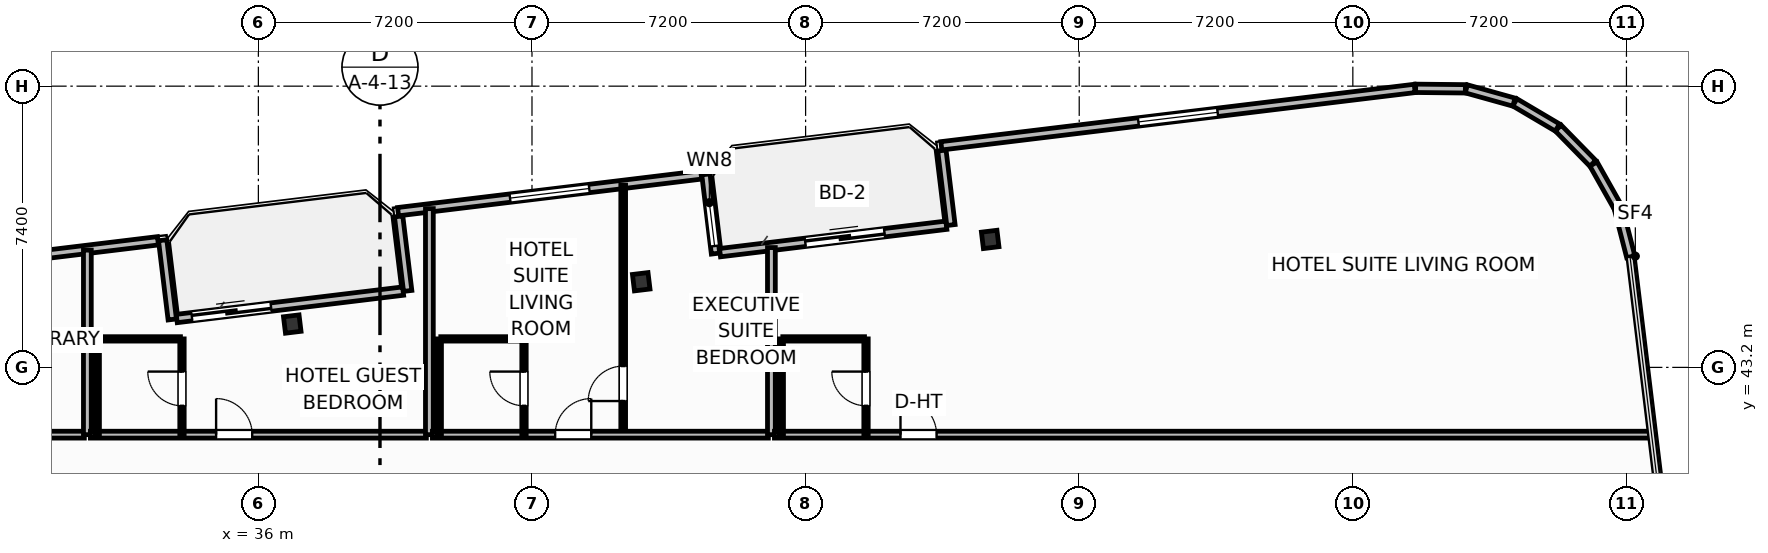
"""IFC4 building model, lengths in metres.
Left out: names, types, materials, properties, quantities, classifications, styles, units other than length and angle.
Written with IfcOpenShell. Run it as: python <this file> out.ifc"""

import sys

from ifc_helpers import new_model, si_unit, direction, frame, frame_2d, origin, origin_2d, place, context, subcontext, project, spatial, rectangle, i_section, extrude, element, fill, save


model = new_model("IFC4")
c1 = context("Model", 3, precision=1e-05, world=origin(), true_north=direction((0.0, 1.0)))
c2 = subcontext(c1, "Body", "Model", "MODEL_VIEW")
j1 = project(units=[si_unit("LENGTHUNIT", "METRE"), si_unit("PLANEANGLEUNIT", "RADIAN")], contexts=[c1])
p1 = place(None, origin())
s1 = spatial("IfcSite", under=j1, at=p1, CompositionType="ELEMENT")
p2 = place(p1, origin())
s2 = spatial("IfcBuilding", under=s1, at=p2, CompositionType="ELEMENT")
p3 = place(p2, frame((0.0, 0.0, 185.7)))
s3 = spatial("IfcBuildingStorey", under=s2, at=p3, CompositionType="ELEMENT", Elevation=185.7)
for number, where, z_axis, x_axis in (
    (1, (55.257, 46.567, 0.0), (0.0, 0.0, 1.0), (0.993, 0.12, 0.0)),
    (2, (46.075, 45.454, 0.0), (0.0, 0.0, 1.0), (0.993, 0.12, 0.0)),
    (3, (36.892, 44.341, 0.0), (0.0, 0.0, 1.0), (0.993, 0.12, 0.0)),
):
    element("IfcColumn", number, at=place(p3, frame(where, z_axis=z_axis, x_axis=x_axis)), inside=s3, PredefinedType="COLUMN", context=c2, shape_type="SweptSolid", body=[
        extrude(i_section(OverallWidth=0.412, OverallDepth=0.435, WebThickness=0.036, FlangeThickness=0.057, FilletRadius=0.025, at=origin_2d()), origin(), (0.0, 0.0, 1.0), 3.7),
    ])
p4 = place(p3, frame((33.852, 44.486, 0.0), z_axis=(0.0, 0.0, 1.0), x_axis=(0.992729951822, 0.120362962556, 0.0)))
e4 = element("IfcWall", 4, at=p4, inside=s3, PredefinedType="SOLIDWALL", context=c2, shape_type="SweptSolid", body=[
    extrude(rectangle(XDim=6.0, YDim=0.22, at=frame_2d((3.0, 0.0))), origin(), (0.0, 0.0, 1.0), 2.73),
])
p5 = place(p4, frame((0.4, 0.0, 0.0)))
e5 = element("IfcOpeningElement", 5, at=p5, cuts=e4, PredefinedType="OPENING", context=c2, shape_type="SweptSolid", body=[
    extrude(rectangle(XDim=2.1, YDim=2.3, at=frame_2d((1.05, 1.15))), frame((0.0, 0.12, 0.0), z_axis=(0.0, -1.0, 0.0), x_axis=(1.0, 0.0, 0.0)), (0.0, 0.0, 1.0), 0.24),
])
p6 = place(p3, frame((48.148, 46.219, 0.0), z_axis=(0.0, 0.0, 1.0), x_axis=(0.992729951822, 0.120362962556, 0.0)))
e6 = element("IfcWall", 6, at=p6, inside=s3, PredefinedType="SOLIDWALL", context=c2, shape_type="SweptSolid", body=[
    extrude(rectangle(XDim=6.0, YDim=0.22, at=frame_2d((3.0, 0.0))), origin(), (0.0, 0.0, 1.0), 2.73),
])
p7 = place(p6, frame((2.26, 0.0, 0.0)))
e7 = element("IfcOpeningElement", 7, at=p7, cuts=e6, PredefinedType="OPENING", context=c2, shape_type="SweptSolid", body=[
    extrude(rectangle(XDim=2.1, YDim=2.3, at=frame_2d((1.05, 1.15))), frame((0.0, 0.12, 0.0), z_axis=(0.0, -1.0, 0.0), x_axis=(1.0, 0.0, 0.0)), (0.0, 0.0, 1.0), 0.24),
])
p8 = place(p3, frame((72.114, 46.112, 0.0), z_axis=(0.0, 0.0, 1.0), x_axis=(-0.248942347653, 0.968518305219, 0.0)))
e8 = element("IfcWall", 8, at=p8, inside=s3, PredefinedType="SOLIDWALL", context=c2, shape_type="SweptSolid", body=[
    extrude(rectangle(XDim=1.326, YDim=0.22, at=frame_2d((0.663, 0.0))), origin(), (0.0, 0.0, 1.0), 2.73),
])
p9 = place(p3, frame((71.771, 47.418, 0.0), z_axis=(0.0, 0.0, 1.0), x_axis=(-0.491098509465, 0.871104043155, 0.0)))
e9 = element("IfcWall", 9, at=p9, inside=s3, PredefinedType="SOLIDWALL", context=c2, shape_type="SweptSolid", body=[
    extrude(rectangle(XDim=1.301, YDim=0.22, at=frame_2d((0.65, 0.0))), origin(), (0.0, 0.0, 1.0), 2.73),
])
p10 = place(p3, frame((71.115, 48.569, 0.0), z_axis=(0.0, 0.0, 1.0), x_axis=(-0.699844331926, 0.714295394827, 0.0)))
e10 = element("IfcWall", 10, at=p10, inside=s3, PredefinedType="SOLIDWALL", context=c2, shape_type="SweptSolid", body=[
    extrude(rectangle(XDim=1.301, YDim=0.22, at=frame_2d((0.65, 0.0))), origin(), (0.0, 0.0, 1.0), 2.73),
])
p11 = place(p3, frame((70.183, 49.511, 0.0), z_axis=(0.0, 0.0, 1.0), x_axis=(-0.860933999601, 0.508716668029, 0.0)))
e11 = element("IfcWall", 11, at=p11, inside=s3, PredefinedType="SOLIDWALL", context=c2, shape_type="SweptSolid", body=[
    extrude(rectangle(XDim=1.301, YDim=0.22, at=frame_2d((0.65, 0.0))), origin(), (0.0, 0.0, 1.0), 2.73),
])
p12 = place(p3, frame((69.039, 50.18, 0.0), z_axis=(0.0, 0.0, 1.0), x_axis=(-0.963205341366, 0.26876657226, 0.0)))
e12 = element("IfcWall", 12, at=p12, inside=s3, PredefinedType="SOLIDWALL", context=c2, shape_type="SweptSolid", body=[
    extrude(rectangle(XDim=1.301, YDim=0.22, at=frame_2d((0.65, 0.0))), origin(), (0.0, 0.0, 1.0), 2.73),
])
p13 = place(p3, frame((67.761, 50.53, 0.0), z_axis=(0.0, 0.0, 1.0), x_axis=(-0.999947358106, 0.010260653861, 0.0)))
e13 = element("IfcWall", 13, at=p13, inside=s3, PredefinedType="SOLIDWALL", context=c2, shape_type="SweptSolid", body=[
    extrude(rectangle(XDim=1.309, YDim=0.22, at=frame_2d((0.654, 0.0))), origin(), (0.0, 0.0, 1.0), 2.73),
])
p14 = place(p3, frame((66.427, 50.54, 0.0), z_axis=(0.0, 0.0, 1.0), x_axis=(-0.992731739233, -0.120348219431, 0.0)))
e14 = element("IfcWall", 14, at=p14, inside=s3, PredefinedType="SOLIDWALL", context=c2, shape_type="SweptSolid", body=[
    extrude(rectangle(XDim=12.547, YDim=0.22, at=frame_2d((6.273, 0.0))), origin(), (0.0, 0.0, 1.0), 2.73),
])
p15 = place(p14, frame((5.224, 0.0, 0.8)))
e15 = element("IfcOpeningElement", 15, at=p15, cuts=e14, PredefinedType="OPENING", context=c2, shape_type="SweptSolid", body=[
    extrude(rectangle(XDim=2.1, YDim=1.75, at=frame_2d((1.05, 0.875))), frame((0.0, 0.12, 0.0), z_axis=(0.0, -1.0, 0.0), x_axis=(1.0, 0.0, 0.0)), (0.0, 0.0, 1.0), 0.24),
])
p16 = place(p3, frame((53.987, 48.906, 0.0), z_axis=(0.0, 0.0, 1.0), x_axis=(0.120397815541, -0.992725725472, 0.0)))
e16 = element("IfcWall", 16, at=p16, inside=s3, PredefinedType="SOLIDWALL", context=c2, shape_type="SweptSolid", body=[
    extrude(rectangle(XDim=1.975, YDim=0.22, at=frame_2d((0.988, 0.0))), origin(), (0.0, 0.0, 1.0), 2.73),
])
p17 = place(p3, frame((48.03, 46.194, 0.0), z_axis=(0.0, 0.0, 1.0), x_axis=(-0.120314009587, 0.992735885871, 0.0)))
e17 = element("IfcWall", 17, at=p17, inside=s3, PredefinedType="SOLIDWALL", context=c2, shape_type="SweptSolid", body=[
    extrude(rectangle(XDim=2.1, YDim=0.22, at=frame_2d((1.05, 0.0))), origin(), (0.0, 0.0, 1.0), 2.73),
])
p18 = place(p17, frame((0.2, 0.0, 0.8)))
e18 = element("IfcOpeningElement", 18, at=p18, cuts=e17, PredefinedType="OPENING", context=c2, shape_type="SweptSolid", body=[
    extrude(rectangle(XDim=1.15, YDim=1.4, at=frame_2d((0.575, 0.7))), frame((0.0, 0.12, 0.0), z_axis=(0.0, -1.0, 0.0), x_axis=(1.0, 0.0, 0.0)), (0.0, 0.0, 1.0), 0.24),
])
p19 = place(p3, frame((47.653, 48.264, 0.0), z_axis=(0.0, 0.0, 1.0), x_axis=(-0.992731032022, -0.120354052946, 0.0)))
e19 = element("IfcWall", 19, at=p19, inside=s3, PredefinedType="SOLIDWALL", context=c2, shape_type="SweptSolid", body=[
    extrude(rectangle(XDim=8.035, YDim=0.22, at=frame_2d((4.018, 0.0))), origin(), (0.0, 0.0, 1.0), 2.73),
])
p20 = place(p19, frame((2.968, 0.0, 0.8)))
e20 = element("IfcOpeningElement", 20, at=p20, cuts=e19, PredefinedType="OPENING", context=c2, shape_type="SweptSolid", body=[
    extrude(rectangle(XDim=2.1, YDim=1.75, at=frame_2d((1.05, 0.875))), frame((0.0, 0.12, 0.0), z_axis=(0.0, -1.0, 0.0), x_axis=(1.0, 0.0, 0.0)), (0.0, 0.0, 1.0), 0.24),
])
p21 = place(p3, frame((39.691, 47.173, 0.0), z_axis=(0.0, 0.0, 1.0), x_axis=(0.120397815541, -0.992725725472, 0.0)))
e21 = element("IfcWall", 21, at=p21, inside=s3, PredefinedType="SOLIDWALL", context=c2, shape_type="SweptSolid", body=[
    extrude(rectangle(XDim=1.975, YDim=0.22, at=frame_2d((0.988, 0.0))), origin(), (0.0, 0.0, 1.0), 2.73),
])
p22 = place(p3, frame((33.734, 44.461, 0.0), z_axis=(0.0, 0.0, 1.0), x_axis=(-0.120327895535, 0.992734202874, 0.0)))
e22 = element("IfcWall", 22, at=p22, inside=s3, PredefinedType="SOLIDWALL", context=c2, shape_type="SweptSolid", body=[
    extrude(rectangle(XDim=2.1, YDim=0.22, at=frame_2d((1.05, 0.0))), origin(), (0.0, 0.0, 1.0), 2.73),
])
p23 = place(p3, frame((33.357, 46.531, 0.0), z_axis=(0.0, 0.0, 1.0), x_axis=(-0.992731032022, -0.120354052946, 0.0)))
e23 = element("IfcWall", 23, at=p23, inside=s3, PredefinedType="SOLIDWALL", context=c2, shape_type="SweptSolid", body=[
    extrude(rectangle(XDim=8.035, YDim=0.22, at=frame_2d((4.018, 0.0))), origin(), (0.0, 0.0, 1.0), 2.73),
])
p24 = place(p23, frame((2.968, 0.0, 0.8)))
e24 = element("IfcOpeningElement", 24, at=p24, cuts=e23, PredefinedType="OPENING", context=c2, shape_type="SweptSolid", body=[
    extrude(rectangle(XDim=2.1, YDim=1.75, at=frame_2d((1.05, 0.875))), frame((0.0, 0.12, 0.0), z_axis=(0.0, -1.0, 0.0), x_axis=(1.0, 0.0, 0.0)), (0.0, 0.0, 1.0), 0.24),
])
p25 = place(p3, frame((3.393, 41.43, 0.0), z_axis=(0.0, 0.0, 1.0), x_axis=(1.0, 0.0, 0.0)))
e25 = element("IfcWall", 25, at=p25, inside=s3, PredefinedType="PARTITIONING", context=c2, shape_type="SweptSolid", body=[
    extrude(rectangle(XDim=28.027, YDim=0.18, at=frame_2d((14.013, 0.0))), origin(), (0.0, 0.0, 1.0), 2.662),
])
p26 = place(p25, frame((22.832, 0.0, 0.0)))
e26 = element("IfcOpeningElement", 26, at=p26, cuts=e25, PredefinedType="OPENING", context=c2, shape_type="SweptSolid", body=[
    extrude(rectangle(XDim=0.95, YDim=2.05, at=frame_2d((0.475, 1.025))), frame((0.0, 0.1, 0.0), z_axis=(0.0, -1.0, 0.0), x_axis=(1.0, 0.0, 0.0)), (0.0, 0.0, 1.0), 0.2),
])
p27 = place(p3, frame((31.5, 41.43, 0.0), z_axis=(0.0, 0.0, 1.0), x_axis=(0.0, 1.0, 0.0)))
e27 = element("IfcWall", 27, at=p27, inside=s3, PredefinedType="PARTITIONING", context=c2, shape_type="SweptSolid", body=[
    extrude(rectangle(XDim=4.856, YDim=0.205, at=frame_2d((2.428, 0.0))), origin(), (0.0, 0.0, 1.0), 3.45),
])
p28 = place(p3, frame((31.58, 41.43, 0.0), z_axis=(0.0, 0.0, 1.0), x_axis=(1.0, 0.0, 0.0)))
e28 = element("IfcWall", 28, at=p28, inside=s3, PredefinedType="PARTITIONING", context=c2, shape_type="SweptSolid", body=[
    extrude(rectangle(XDim=8.84, YDim=0.18, at=frame_2d((4.42, 0.0))), origin(), (0.0, 0.0, 1.0), 3.45),
])
p29 = place(p28, frame((3.308, 0.0, 0.0)))
e29 = element("IfcOpeningElement", 29, at=p29, cuts=e28, PredefinedType="OPENING", context=c2, shape_type="SweptSolid", body=[
    extrude(rectangle(XDim=0.95, YDim=2.15, at=frame_2d((0.475, 1.075))), frame((0.0, 0.1, 0.0), z_axis=(0.0, -1.0, 0.0), x_axis=(1.0, 0.0, 0.0)), (0.0, 0.0, 1.0), 0.2),
])
p30 = place(p3, frame((31.8, 43.95, 0.0), z_axis=(0.0, 0.0, 1.0), x_axis=(1.0, 0.0, 0.0)))
e30 = element("IfcWall", 30, at=p30, inside=s3, PredefinedType="PARTITIONING", context=c2, shape_type="SweptSolid", body=[
    extrude(rectangle(XDim=2.15, YDim=0.115, at=frame_2d((1.075, 0.0))), origin(), (0.0, 0.0, 1.0), 2.824),
])
p31 = place(p3, frame((33.99, 41.43, 0.0), z_axis=(0.0, 0.0, 1.0), x_axis=(0.0, 1.0, 0.0)))
e31 = element("IfcWall", 31, at=p31, inside=s3, PredefinedType="PARTITIONING", context=c2, shape_type="SweptSolid", body=[
    extrude(rectangle(XDim=2.52, YDim=0.115, at=frame_2d((1.26, 0.0))), origin(), (0.0, 0.0, 1.0), 3.45),
])
p32 = place(p31, frame((0.76, 0.0, 0.0)))
e32 = element("IfcOpeningElement", 32, at=p32, cuts=e31, PredefinedType="OPENING", context=c2, shape_type="SweptSolid", body=[
    extrude(rectangle(XDim=0.9, YDim=2.05, at=frame_2d((0.45, 1.025))), frame((0.0, 0.067, 0.0), z_axis=(0.0, -1.0, 0.0), x_axis=(1.0, 0.0, 0.0)), (0.0, 0.0, 1.0), 0.135),
])
p33 = place(p3, frame((31.76, 41.43, 0.0), z_axis=(0.0, 0.0, 1.0), x_axis=(0.0, 1.0, 0.0)))
e33 = element("IfcWall", 33, at=p33, inside=s3, PredefinedType="PARTITIONING", context=c2, shape_type="SweptSolid", body=[
    extrude(rectangle(XDim=2.52, YDim=0.115, at=frame_2d((1.26, 0.0))), origin(), (0.0, 0.0, 1.0), 3.45),
])
p34 = place(p3, frame((40.5, 41.43, 0.0), z_axis=(0.0, 0.0, 1.0), x_axis=(0.0, 1.0, 0.0)))
e34 = element("IfcWall", 34, at=p34, inside=s3, PredefinedType="PARTITIONING", context=c2, shape_type="SweptSolid", body=[
    extrude(rectangle(XDim=5.947, YDim=0.205, at=frame_2d((2.974, 0.0))), origin(), (0.0, 0.0, 1.0), 3.45),
])
p35 = place(p3, frame((45.6, 41.43, 0.0), z_axis=(0.0, 0.0, 1.0), x_axis=(0.0, 1.0, 0.0)))
e35 = element("IfcWall", 35, at=p35, inside=s3, PredefinedType="PARTITIONING", context=c2, shape_type="SweptSolid", body=[
    extrude(rectangle(XDim=6.565, YDim=0.125, at=frame_2d((3.283, 0.0))), origin(), (0.0, 0.0, 1.0), 3.45),
])
p36 = place(p35, frame((0.885, 0.0, 0.0)))
e36 = element("IfcOpeningElement", 36, at=p36, cuts=e35, PredefinedType="OPENING", context=c2, shape_type="SweptSolid", body=[
    extrude(rectangle(XDim=0.92, YDim=2.05, at=frame_2d((0.46, 1.025))), frame((0.0, 0.073, 0.0), z_axis=(0.0, -1.0, 0.0), x_axis=(1.0, 0.0, 0.0)), (0.0, 0.0, 1.0), 0.145),
])
p37 = place(p3, frame((40.58, 41.43, 0.0), z_axis=(0.0, 0.0, 1.0), x_axis=(1.0, 0.0, 0.0)))
e37 = element("IfcWall", 37, at=p37, inside=s3, PredefinedType="PARTITIONING", context=c2, shape_type="SweptSolid", body=[
    extrude(rectangle(XDim=8.84, YDim=0.18, at=frame_2d((4.42, 0.0))), origin(), (0.0, 0.0, 1.0), 3.45),
])
p38 = place(p37, frame((3.23, 0.0, 0.0)))
e38 = element("IfcOpeningElement", 38, at=p38, cuts=e37, PredefinedType="OPENING", context=c2, shape_type="SweptSolid", body=[
    extrude(rectangle(XDim=0.95, YDim=2.15, at=frame_2d((0.475, 1.075))), frame((0.0, 0.1, 0.0), z_axis=(0.0, -1.0, 0.0), x_axis=(1.0, 0.0, 0.0)), (0.0, 0.0, 1.0), 0.2),
])
p39 = place(p3, frame((40.8, 43.95, 0.0), z_axis=(0.0, 0.0, 1.0), x_axis=(1.0, 0.0, 0.0)))
e39 = element("IfcWall", 39, at=p39, inside=s3, PredefinedType="PARTITIONING", context=c2, shape_type="SweptSolid", body=[
    extrude(rectangle(XDim=2.15, YDim=0.115, at=frame_2d((1.075, 0.0))), origin(), (0.0, 0.0, 1.0), 3.45),
])
p40 = place(p3, frame((42.99, 41.43, 0.0), z_axis=(0.0, 0.0, 1.0), x_axis=(0.0, 1.0, 0.0)))
e40 = element("IfcWall", 40, at=p40, inside=s3, PredefinedType="PARTITIONING", context=c2, shape_type="SweptSolid", body=[
    extrude(rectangle(XDim=2.52, YDim=0.115, at=frame_2d((1.26, 0.0))), origin(), (0.0, 0.0, 1.0), 3.45),
])
p41 = place(p40, frame((0.76, 0.0, 0.0)))
e41 = element("IfcOpeningElement", 41, at=p41, cuts=e40, PredefinedType="OPENING", context=c2, shape_type="SweptSolid", body=[
    extrude(rectangle(XDim=0.9, YDim=2.05, at=frame_2d((0.45, 1.025))), frame((0.0, 0.067, 0.0), z_axis=(0.0, -1.0, 0.0), x_axis=(1.0, 0.0, 0.0)), (0.0, 0.0, 1.0), 0.135),
])
p42 = place(p3, frame((40.76, 41.43, 0.0), z_axis=(0.0, 0.0, 1.0), x_axis=(0.0, 1.0, 0.0)))
e42 = element("IfcWall", 42, at=p42, inside=s3, PredefinedType="PARTITIONING", context=c2, shape_type="SweptSolid", body=[
    extrude(rectangle(XDim=2.52, YDim=0.115, at=frame_2d((1.26, 0.0))), origin(), (0.0, 0.0, 1.0), 3.45),
])
p43 = place(p3, frame((49.5, 41.43, 0.0), z_axis=(0.0, 0.0, 1.0), x_axis=(0.0, 1.0, 0.0)))
e43 = element("IfcWall", 43, at=p43, inside=s3, PredefinedType="PARTITIONING", context=c2, shape_type="SweptSolid", body=[
    extrude(rectangle(XDim=4.923, YDim=0.205, at=frame_2d((2.461, 0.0))), origin(), (0.0, 0.0, 1.0), 3.45),
])
p44 = place(p3, frame((49.58, 41.43, 0.0), z_axis=(0.0, 0.0, 1.0), x_axis=(1.0, 0.0, 0.0)))
e44 = element("IfcWall", 44, at=p44, inside=s3, PredefinedType="PARTITIONING", context=c2, shape_type="SweptSolid", body=[
    extrude(rectangle(XDim=23.042, YDim=0.18, at=frame_2d((11.521, 0.0))), origin(), (0.0, 0.0, 1.0), 3.45),
])
p45 = place(p44, frame((3.317, 0.0, 0.0)))
e45 = element("IfcOpeningElement", 45, at=p45, cuts=e44, PredefinedType="OPENING", context=c2, shape_type="SweptSolid", body=[
    extrude(rectangle(XDim=0.95, YDim=2.15, at=frame_2d((0.475, 1.075))), frame((0.0, 0.1, 0.0), z_axis=(0.0, -1.0, 0.0), x_axis=(1.0, 0.0, 0.0)), (0.0, 0.0, 1.0), 0.2),
])
p46 = place(p3, frame((49.8, 43.95, 0.0), z_axis=(0.0, 0.0, 1.0), x_axis=(1.0, 0.0, 0.0)))
e46 = element("IfcWall", 46, at=p46, inside=s3, PredefinedType="PARTITIONING", context=c2, shape_type="SweptSolid", body=[
    extrude(rectangle(XDim=2.15, YDim=0.115, at=frame_2d((1.075, 0.0))), origin(), (0.0, 0.0, 1.0), 3.45),
])
p47 = place(p3, frame((51.99, 41.43, 0.0), z_axis=(0.0, 0.0, 1.0), x_axis=(0.0, 1.0, 0.0)))
e47 = element("IfcWall", 47, at=p47, inside=s3, PredefinedType="PARTITIONING", context=c2, shape_type="SweptSolid", body=[
    extrude(rectangle(XDim=2.52, YDim=0.115, at=frame_2d((1.26, 0.0))), origin(), (0.0, 0.0, 1.0), 3.45),
])
p48 = place(p47, frame((0.76, 0.0, 0.0)))
e48 = element("IfcOpeningElement", 48, at=p48, cuts=e47, PredefinedType="OPENING", context=c2, shape_type="SweptSolid", body=[
    extrude(rectangle(XDim=0.9, YDim=2.05, at=frame_2d((0.45, 1.025))), frame((0.0, 0.067, 0.0), z_axis=(0.0, -1.0, 0.0), x_axis=(1.0, 0.0, 0.0)), (0.0, 0.0, 1.0), 0.135),
])
p49 = place(p3, frame((49.76, 41.43, 0.0), z_axis=(0.0, 0.0, 1.0), x_axis=(0.0, 1.0, 0.0)))
e49 = element("IfcWall", 49, at=p49, inside=s3, PredefinedType="PARTITIONING", context=c2, shape_type="SweptSolid", body=[
    extrude(rectangle(XDim=2.52, YDim=0.115, at=frame_2d((1.26, 0.0))), origin(), (0.0, 0.0, 1.0), 3.45),
])
p50 = place(p5, origin())
e50 = element("IfcDoor", 50, at=p50, inside=s3, OperationType="SLIDING_TO_LEFT", PredefinedType="DOOR", context=c2, shape_type="SweptSolid", body=[
    extrude(rectangle(XDim=2.1, YDim=2.3, at=frame_2d((1.05, 1.15))), frame((0.0, 0.025, 0.0), z_axis=(0.0, -1.0, 0.0), x_axis=(1.0, 0.0, 0.0)), (0.0, 0.0, 1.0), 0.05),
])
fill(e5, e50)
p51 = place(p7, origin())
e51 = element("IfcDoor", 51, at=p51, inside=s3, OperationType="SLIDING_TO_LEFT", PredefinedType="DOOR", context=c2, shape_type="SweptSolid", body=[
    extrude(rectangle(XDim=2.1, YDim=2.3, at=frame_2d((1.05, 1.15))), frame((0.0, 0.025, 0.0), z_axis=(0.0, -1.0, 0.0), x_axis=(1.0, 0.0, 0.0)), (0.0, 0.0, 1.0), 0.05),
])
fill(e7, e51)
p52 = place(p15, origin())
e52 = element("IfcWindow", 52, at=p52, inside=s3, PartitioningType="SINGLE_PANEL", PredefinedType="WINDOW", context=c2, shape_type="SweptSolid", body=[
    extrude(rectangle(XDim=2.1, YDim=1.75, at=frame_2d((1.05, 0.875))), frame((0.0, 0.03, 0.0), z_axis=(0.0, -1.0, 0.0), x_axis=(1.0, 0.0, 0.0)), (0.0, 0.0, 1.0), 0.06),
])
fill(e15, e52)
p53 = place(p20, origin())
e53 = element("IfcWindow", 53, at=p53, inside=s3, PartitioningType="SINGLE_PANEL", PredefinedType="WINDOW", context=c2, shape_type="SweptSolid", body=[
    extrude(rectangle(XDim=2.1, YDim=1.75, at=frame_2d((1.05, 0.875))), frame((0.0, 0.03, 0.0), z_axis=(0.0, -1.0, 0.0), x_axis=(1.0, 0.0, 0.0)), (0.0, 0.0, 1.0), 0.06),
])
fill(e20, e53)
p54 = place(p29, origin())
e54 = element("IfcDoor", 54, at=p54, inside=s3, OperationType="SINGLE_SWING_LEFT", PredefinedType="DOOR", context=c2, shape_type="SweptSolid", body=[
    extrude(rectangle(XDim=0.95, YDim=2.15, at=frame_2d((0.475, 1.075))), frame((0.0, 0.025, 0.0), z_axis=(0.0, -1.0, 0.0), x_axis=(1.0, 0.0, 0.0)), (0.0, 0.0, 1.0), 0.05),
])
fill(e29, e54)
p55 = place(p32, origin())
e55 = element("IfcDoor", 55, at=p55, inside=s3, OperationType="SINGLE_SWING_RIGHT", PredefinedType="DOOR", context=c2, shape_type="SweptSolid", body=[
    extrude(rectangle(XDim=0.9, YDim=2.05, at=frame_2d((0.45, 1.025))), frame((0.0, 0.025, 0.0), z_axis=(0.0, -1.0, 0.0), x_axis=(1.0, 0.0, 0.0)), (0.0, 0.0, 1.0), 0.05),
])
fill(e32, e55)
p56 = place(p36, origin())
e56 = element("IfcDoor", 56, at=p56, inside=s3, OperationType="SINGLE_SWING_LEFT", PredefinedType="DOOR", context=c2, shape_type="SweptSolid", body=[
    extrude(rectangle(XDim=0.92, YDim=2.05, at=frame_2d((0.46, 1.025))), frame((0.0, 0.025, 0.0), z_axis=(0.0, -1.0, 0.0), x_axis=(1.0, 0.0, 0.0)), (0.0, 0.0, 1.0), 0.05),
])
fill(e36, e56)
p57 = place(p38, origin())
e57 = element("IfcDoor", 57, at=p57, inside=s3, OperationType="SINGLE_SWING_RIGHT", PredefinedType="DOOR", context=c2, shape_type="SweptSolid", body=[
    extrude(rectangle(XDim=0.95, YDim=2.15, at=frame_2d((0.475, 1.075))), frame((0.0, 0.025, 0.0), z_axis=(0.0, -1.0, 0.0), x_axis=(1.0, 0.0, 0.0)), (0.0, 0.0, 1.0), 0.05),
])
fill(e38, e57)
p58 = place(p41, origin())
e58 = element("IfcDoor", 58, at=p58, inside=s3, OperationType="SINGLE_SWING_RIGHT", PredefinedType="DOOR", context=c2, shape_type="SweptSolid", body=[
    extrude(rectangle(XDim=0.9, YDim=2.05, at=frame_2d((0.45, 1.025))), frame((0.0, 0.025, 0.0), z_axis=(0.0, -1.0, 0.0), x_axis=(1.0, 0.0, 0.0)), (0.0, 0.0, 1.0), 0.05),
])
fill(e41, e58)
p59 = place(p45, origin())
e59 = element("IfcDoor", 59, at=p59, inside=s3, OperationType="SINGLE_SWING_LEFT", PredefinedType="DOOR", context=c2, shape_type="SweptSolid", body=[
    extrude(rectangle(XDim=0.95, YDim=2.15, at=frame_2d((0.475, 1.075))), frame((0.0, 0.025, 0.0), z_axis=(0.0, -1.0, 0.0), x_axis=(1.0, 0.0, 0.0)), (0.0, 0.0, 1.0), 0.05),
])
fill(e45, e59)
p60 = place(p48, origin())
e60 = element("IfcDoor", 60, at=p60, inside=s3, OperationType="SINGLE_SWING_RIGHT", PredefinedType="DOOR", context=c2, shape_type="SweptSolid", body=[
    extrude(rectangle(XDim=0.9, YDim=2.05, at=frame_2d((0.45, 1.025))), frame((0.0, 0.025, 0.0), z_axis=(0.0, -1.0, 0.0), x_axis=(1.0, 0.0, 0.0)), (0.0, 0.0, 1.0), 0.05),
])
fill(e48, e60)
p61 = place(p18, origin())
e61 = element("IfcWindow", 61, at=p61, inside=s3, PartitioningType="SINGLE_PANEL", PredefinedType="WINDOW", context=c2, shape_type="SweptSolid", body=[
    extrude(rectangle(XDim=1.15, YDim=1.4, at=frame_2d((0.575, 0.7))), frame((0.0, 0.03, 0.0), z_axis=(0.0, -1.0, 0.0), x_axis=(1.0, 0.0, 0.0)), (0.0, 0.0, 1.0), 0.06),
])
fill(e18, e61)
save(model, sys.argv[1])
